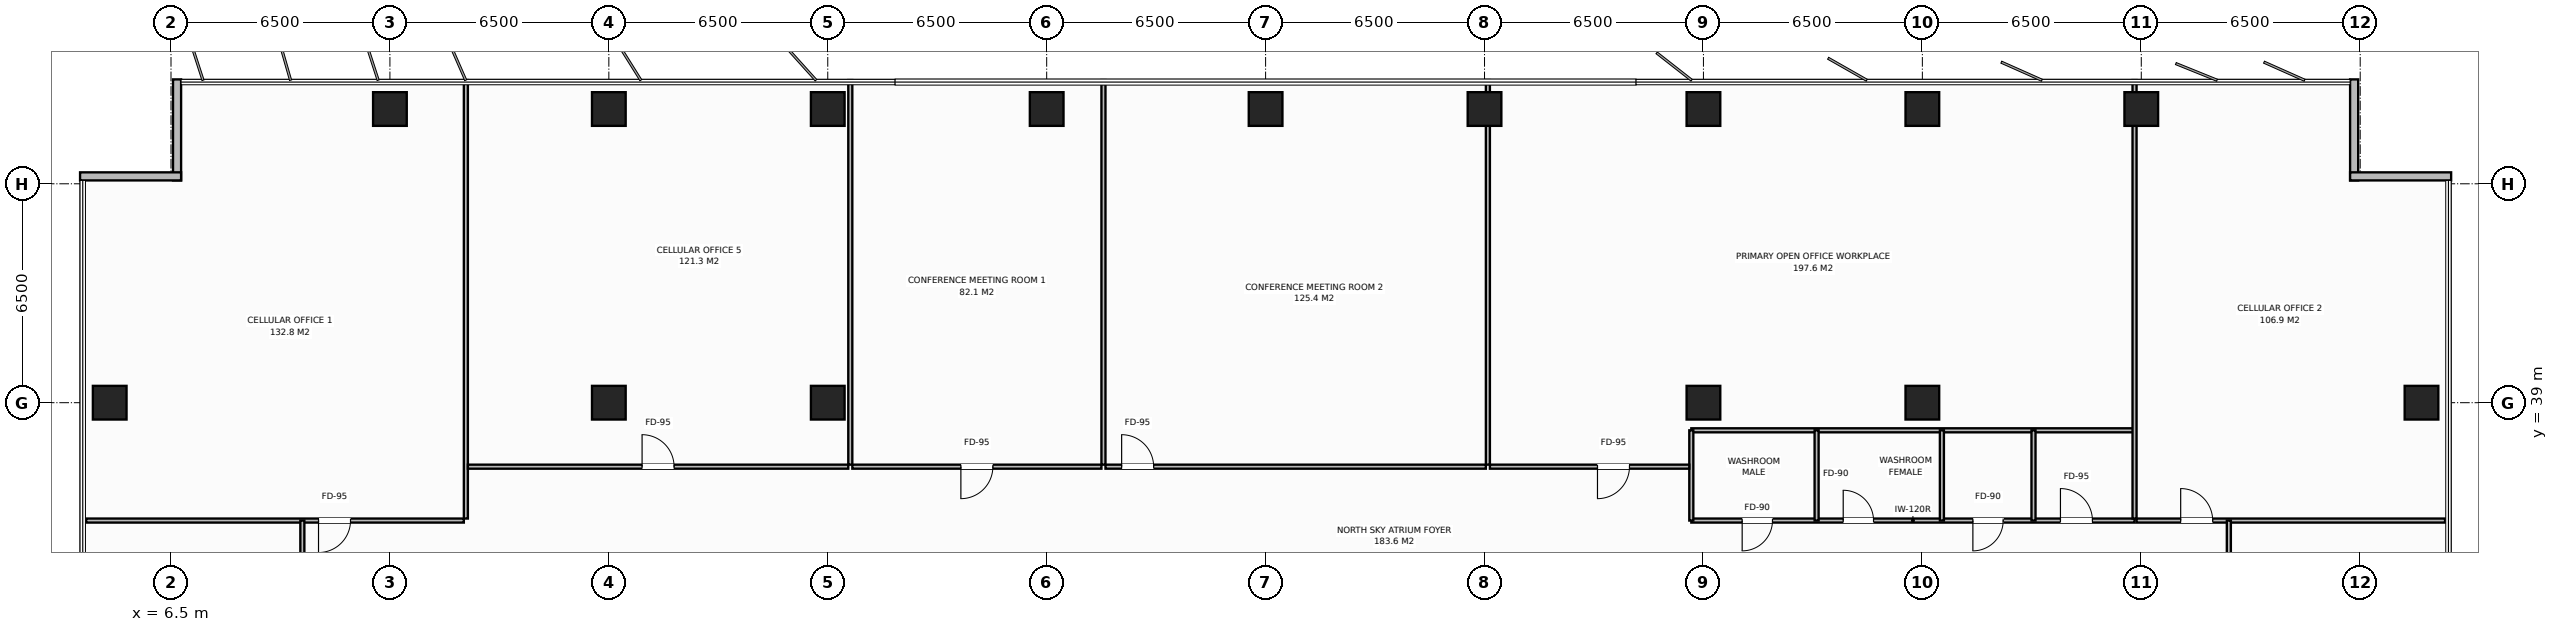
"""IFC4 building model, lengths in metres.
Left out: names, types, materials, properties, quantities, classifications, styles, units other than length and angle.
Written with IfcOpenShell. Run it as: python <this file> out.ifc"""

import sys

from ifc_helpers import new_model, si_unit, direction, frame, frame_2d, origin, origin_2d, place, context, subcontext, project, spatial, rectangle, extrude, element, fill, save


model = new_model("IFC4")
c1 = context("Model", 3, precision=1e-05, world=origin(), true_north=direction((0.0, 1.0)))
c2 = subcontext(c1, "Body", "Model", "MODEL_VIEW")
j1 = project(units=[si_unit("LENGTHUNIT", "METRE"), si_unit("PLANEANGLEUNIT", "RADIAN")], contexts=[c1])
p1 = place(None, origin())
s1 = spatial("IfcSite", under=j1, at=p1, CompositionType="ELEMENT")
p2 = place(p1, origin())
s2 = spatial("IfcBuilding", under=s1, at=p2, CompositionType="ELEMENT")
p3 = place(p2, frame((0.0, 0.0, 167.0)))
s3 = spatial("IfcBuildingStorey", under=s2, at=p3, CompositionType="ELEMENT", Elevation=167.0)
for number, where, z_axis, x_axis in (
    (1, (19.5, 39.0, 0.0), (0.0, 0.0, 1.0), (1.0, 0.0, 0.0)),
    (2, (58.5, 39.0, 0.0), (0.0, 0.0, 1.0), (1.0, 0.0, 0.0)),
    (3, (26.0, 39.0, 0.0), (0.0, 0.0, 1.0), (1.0, 0.0, 0.0)),
    (4, (52.0, 39.0, 0.0), (0.0, 0.0, 1.0), (1.0, 0.0, 0.0)),
    (5, (13.0, 47.72, 0.0), (0.0, 0.0, 1.0), (1.0, 0.0, 0.0)),
    (6, (19.5, 47.72, 0.0), (0.0, 0.0, 1.0), (1.0, 0.0, 0.0)),
    (7, (26.0, 47.72, 0.0), (0.0, 0.0, 1.0), (1.0, 0.0, 0.0)),
    (8, (32.5, 47.72, 0.0), (0.0, 0.0, 1.0), (1.0, 0.0, 0.0)),
    (9, (39.0, 47.72, 0.0), (0.0, 0.0, 1.0), (1.0, 0.0, 0.0)),
    (10, (45.5, 47.72, 0.0), (0.0, 0.0, 1.0), (1.0, 0.0, 0.0)),
    (11, (52.0, 47.72, 0.0), (0.0, 0.0, 1.0), (1.0, 0.0, 0.0)),
    (12, (58.5, 47.72, 0.0), (0.0, 0.0, 1.0), (1.0, 0.0, 0.0)),
    (13, (65.0, 47.72, 0.0), (0.0, 0.0, 1.0), (1.0, 0.0, 0.0)),
    (14, (4.68, 39.0, 0.0), (0.0, 0.0, 1.0), (1.0, 0.0, 0.0)),
    (15, (73.32, 39.0, 0.0), (0.0, 0.0, 1.0), (1.0, 0.0, 0.0)),
):
    element("IfcColumn", number, at=place(p3, frame(where, z_axis=z_axis, x_axis=x_axis)), inside=s3, PredefinedType="COLUMN", context=c2, shape_type="SweptSolid", body=[
        extrude(rectangle(XDim=1.0, YDim=1.0, at=origin_2d()), origin(), (0.0, 0.0, 1.0), 3.8),
    ])
for number, where, z_axis, x_axis in (
    (16, (6.68, 45.6, 0.0), (0.0, 0.0, 1.0), (0.0, 1.0, 0.0)),
    (17, (3.8, 45.72, 0.0), (0.0, 0.0, 1.0), (1.0, 0.0, 0.0)),
    (18, (71.32, 48.6, 0.0), (0.0, 0.0, 1.0), (0.0, -1.0, 0.0)),
    (19, (71.2, 45.72, 0.0), (0.0, 0.0, 1.0), (1.0, 0.0, 0.0)),
):
    element("IfcWall", number, at=place(p3, frame(where, z_axis=z_axis, x_axis=x_axis)), inside=s3, PredefinedType="STANDARD", context=c2, shape_type="SweptSolid", body=[
        extrude(rectangle(XDim=3.0, YDim=0.24, at=frame_2d((1.5, 0.0))), origin(), (0.0, 0.0, 1.0), 3.572),
    ])
p4 = place(p3, frame((51.64, 35.5, 0.0), z_axis=(0.0, 0.0, 1.0), x_axis=(1.0, 0.0, 0.0)))
e20 = element("IfcWall", 20, at=p4, inside=s3, PredefinedType="PARTITIONING", context=c2, shape_type="SweptSolid", body=[
    extrude(rectangle(XDim=13.16, YDim=0.12, at=frame_2d((6.58, 0.0))), origin(), (0.0, 0.0, 1.0), 3.572),
])
p5 = place(p4, frame((1.51, 0.0, 0.0)))
e21 = element("IfcOpeningElement", 21, at=p5, cuts=e20, PredefinedType="OPENING", context=c2, shape_type="SweptSolid", body=[
    extrude(rectangle(XDim=0.9, YDim=2.15, at=frame_2d((0.45, 1.075))), frame((0.0, 0.07, 0.0), z_axis=(0.0, -1.0, 0.0), x_axis=(1.0, 0.0, 0.0)), (0.0, 0.0, 1.0), 0.14),
])
p6 = place(p4, frame((4.51, 0.0, 0.0)))
e22 = element("IfcOpeningElement", 22, at=p6, cuts=e20, PredefinedType="OPENING", context=c2, shape_type="SweptSolid", body=[
    extrude(rectangle(XDim=0.9, YDim=2.15, at=frame_2d((0.45, 1.075))), frame((0.0, 0.07, 0.0), z_axis=(0.0, -1.0, 0.0), x_axis=(1.0, 0.0, 0.0)), (0.0, 0.0, 1.0), 0.14),
])
p7 = place(p4, frame((8.36, 0.0, 0.0)))
e23 = element("IfcOpeningElement", 23, at=p7, cuts=e20, PredefinedType="OPENING", context=c2, shape_type="SweptSolid", body=[
    extrude(rectangle(XDim=0.9, YDim=2.15, at=frame_2d((0.45, 1.075))), frame((0.0, 0.07, 0.0), z_axis=(0.0, -1.0, 0.0), x_axis=(1.0, 0.0, 0.0)), (0.0, 0.0, 1.0), 0.14),
])
p8 = place(p4, frame((10.96, 0.0, 0.0)))
e24 = element("IfcOpeningElement", 24, at=p8, cuts=e20, PredefinedType="OPENING", context=c2, shape_type="SweptSolid", body=[
    extrude(rectangle(XDim=0.95, YDim=2.15, at=frame_2d((0.475, 1.075))), frame((0.0, 0.07, 0.0), z_axis=(0.0, -1.0, 0.0), x_axis=(1.0, 0.0, 0.0)), (0.0, 0.0, 1.0), 0.14),
])
p9 = place(p3, frame((51.64, 38.18, 0.0), z_axis=(0.0, 0.0, 1.0), x_axis=(1.0, 0.0, 0.0)))
e25 = element("IfcWall", 25, at=p9, inside=s3, PredefinedType="PARTITIONING", context=c2, shape_type="SweptSolid", body=[
    extrude(rectangle(XDim=13.16, YDim=0.12, at=frame_2d((6.58, 0.0))), origin(), (0.0, 0.0, 1.0), 3.572),
])
for number, where, z_axis, x_axis in (
    (26, (51.64, 35.5, 0.0), (0.0, 0.0, 1.0), (0.0, 1.0, 0.0)),
    (27, (55.36, 35.5, 0.0), (0.0, 0.0, 1.0), (0.0, 1.0, 0.0)),
    (28, (59.08, 35.5, 0.0), (0.0, 0.0, 1.0), (0.0, 1.0, 0.0)),
    (29, (61.8, 35.5, 0.0), (0.0, 0.0, 1.0), (0.0, 1.0, 0.0)),
):
    element("IfcWall", number, at=place(p3, frame(where, z_axis=z_axis, x_axis=x_axis)), inside=s3, PredefinedType="PARTITIONING", context=c2, shape_type="SweptSolid", body=[
        extrude(rectangle(XDim=2.68, YDim=0.12, at=frame_2d((1.34, 0.0))), origin(), (0.0, 0.0, 1.0), 3.572),
    ])
p10 = place(p3, frame((15.255, 35.56, 0.0), z_axis=(0.0, 0.0, 1.0), x_axis=(0.0, 1.0, 0.0)))
e30 = element("IfcWall", 30, at=p10, inside=s3, PredefinedType="PARTITIONING", context=c2, shape_type="SweptSolid", body=[
    extrude(rectangle(XDim=13.02, YDim=0.12, at=frame_2d((6.51, 0.0))), origin(), (0.0, 0.0, 1.0), 3.572),
])
p11 = place(p3, frame((3.98, 35.5, 0.0), z_axis=(0.0, 0.0, 1.0), x_axis=(1.0, 0.0, 0.0)))
e31 = element("IfcWall", 31, at=p11, inside=s3, PredefinedType="PARTITIONING", context=c2, shape_type="SweptSolid", body=[
    extrude(rectangle(XDim=11.215, YDim=0.12, at=frame_2d((5.607, 0.0))), origin(), (0.0, 0.0, 1.0), 3.572),
])
p12 = place(p11, frame((6.9, 0.0, 0.0)))
e32 = element("IfcOpeningElement", 32, at=p12, cuts=e31, PredefinedType="OPENING", context=c2, shape_type="SweptSolid", body=[
    extrude(rectangle(XDim=0.95, YDim=2.15, at=frame_2d((0.475, 1.075))), frame((0.0, 0.07, 0.0), z_axis=(0.0, -1.0, 0.0), x_axis=(1.0, 0.0, 0.0)), (0.0, 0.0, 1.0), 0.14),
])
p13 = place(p3, frame((26.669, 37.16, 0.0), z_axis=(0.0, 0.0, 1.0), x_axis=(0.0, 1.0, 0.0)))
e33 = element("IfcWall", 33, at=p13, inside=s3, PredefinedType="PARTITIONING", context=c2, shape_type="SweptSolid", body=[
    extrude(rectangle(XDim=11.42, YDim=0.12, at=frame_2d((5.71, 0.0))), origin(), (0.0, 0.0, 1.0), 3.572),
])
p14 = place(p3, frame((15.315, 37.1, 0.0), z_axis=(0.0, 0.0, 1.0), x_axis=(1.0, 0.0, 0.0)))
e34 = element("IfcWall", 34, at=p14, inside=s3, PredefinedType="PARTITIONING", context=c2, shape_type="SweptSolid", body=[
    extrude(rectangle(XDim=11.294, YDim=0.12, at=frame_2d((5.647, 0.0))), origin(), (0.0, 0.0, 1.0), 3.572),
])
p15 = place(p14, frame((5.172, 0.0, 0.0)))
e35 = element("IfcOpeningElement", 35, at=p15, cuts=e34, PredefinedType="OPENING", context=c2, shape_type="SweptSolid", body=[
    extrude(rectangle(XDim=0.95, YDim=2.15, at=frame_2d((0.475, 1.075))), frame((0.0, 0.07, 0.0), z_axis=(0.0, -1.0, 0.0), x_axis=(1.0, 0.0, 0.0)), (0.0, 0.0, 1.0), 0.14),
])
p16 = place(p3, frame((34.186, 37.16, 0.0), z_axis=(0.0, 0.0, 1.0), x_axis=(0.0, 1.0, 0.0)))
e36 = element("IfcWall", 36, at=p16, inside=s3, PredefinedType="PARTITIONING", context=c2, shape_type="SweptSolid", body=[
    extrude(rectangle(XDim=11.42, YDim=0.12, at=frame_2d((5.71, 0.0))), origin(), (0.0, 0.0, 1.0), 3.572),
])
p17 = place(p3, frame((26.729, 37.1, 0.0), z_axis=(0.0, 0.0, 1.0), x_axis=(1.0, 0.0, 0.0)))
e37 = element("IfcWall", 37, at=p17, inside=s3, PredefinedType="PARTITIONING", context=c2, shape_type="SweptSolid", body=[
    extrude(rectangle(XDim=7.396, YDim=0.12, at=frame_2d((3.698, 0.0))), origin(), (0.0, 0.0, 1.0), 3.572),
])
p18 = place(p17, frame((3.223, 0.0, 0.0)))
e38 = element("IfcOpeningElement", 38, at=p18, cuts=e37, PredefinedType="OPENING", context=c2, shape_type="SweptSolid", body=[
    extrude(rectangle(XDim=0.95, YDim=2.15, at=frame_2d((0.475, 1.075))), frame((0.0, 0.07, 0.0), z_axis=(0.0, -1.0, 0.0), x_axis=(1.0, 0.0, 0.0)), (0.0, 0.0, 1.0), 0.14),
])
p19 = place(p3, frame((45.6, 37.16, 0.0), z_axis=(0.0, 0.0, 1.0), x_axis=(0.0, 1.0, 0.0)))
e39 = element("IfcWall", 39, at=p19, inside=s3, PredefinedType="PARTITIONING", context=c2, shape_type="SweptSolid", body=[
    extrude(rectangle(XDim=11.42, YDim=0.12, at=frame_2d((5.71, 0.0))), origin(), (0.0, 0.0, 1.0), 3.022),
])
p20 = place(p3, frame((34.246, 37.1, 0.0), z_axis=(0.0, 0.0, 1.0), x_axis=(1.0, 0.0, 0.0)))
e40 = element("IfcWall", 40, at=p20, inside=s3, PredefinedType="PARTITIONING", context=c2, shape_type="SweptSolid", body=[
    extrude(rectangle(XDim=11.294, YDim=0.12, at=frame_2d((5.647, 0.0))), origin(), (0.0, 0.0, 1.0), 3.572),
])
p21 = place(p20, frame((0.48, 0.0, 0.0)))
e41 = element("IfcOpeningElement", 41, at=p21, cuts=e40, PredefinedType="OPENING", context=c2, shape_type="SweptSolid", body=[
    extrude(rectangle(XDim=0.95, YDim=2.15, at=frame_2d((0.475, 1.075))), frame((0.0, 0.07, 0.0), z_axis=(0.0, -1.0, 0.0), x_axis=(1.0, 0.0, 0.0)), (0.0, 0.0, 1.0), 0.14),
])
p22 = place(p3, frame((64.8, 35.56, 0.0), z_axis=(0.0, 0.0, 1.0), x_axis=(0.0, 1.0, 0.0)))
e42 = element("IfcWall", 42, at=p22, inside=s3, PredefinedType="PARTITIONING", context=c2, shape_type="SweptSolid", body=[
    extrude(rectangle(XDim=13.02, YDim=0.12, at=frame_2d((6.51, 0.0))), origin(), (0.0, 0.0, 1.0), 3.022),
])
p23 = place(p3, frame((45.66, 37.1, 0.0), z_axis=(0.0, 0.0, 1.0), x_axis=(1.0, 0.0, 0.0)))
e43 = element("IfcWall", 43, at=p23, inside=s3, PredefinedType="PARTITIONING", context=c2, shape_type="SweptSolid", body=[
    extrude(rectangle(XDim=5.92, YDim=0.12, at=frame_2d((2.96, 0.0))), origin(), (0.0, 0.0, 1.0), 3.572),
])
p24 = place(p23, frame((3.194, 0.0, 0.0)))
e44 = element("IfcOpeningElement", 44, at=p24, cuts=e43, PredefinedType="OPENING", context=c2, shape_type="SweptSolid", body=[
    extrude(rectangle(XDim=0.95, YDim=2.15, at=frame_2d((0.475, 1.075))), frame((0.0, 0.07, 0.0), z_axis=(0.0, -1.0, 0.0), x_axis=(1.0, 0.0, 0.0)), (0.0, 0.0, 1.0), 0.14),
])
p25 = place(p3, frame((64.86, 35.5, 0.0), z_axis=(0.0, 0.0, 1.0), x_axis=(1.0, 0.0, 0.0)))
e45 = element("IfcWall", 45, at=p25, inside=s3, PredefinedType="PARTITIONING", context=c2, shape_type="SweptSolid", body=[
    extrude(rectangle(XDim=9.16, YDim=0.12, at=frame_2d((4.58, 0.0))), origin(), (0.0, 0.0, 1.0), 3.572),
])
p26 = place(p25, frame((1.31, 0.0, 0.0)))
e46 = element("IfcOpeningElement", 46, at=p26, cuts=e45, PredefinedType="OPENING", context=c2, shape_type="SweptSolid", body=[
    extrude(rectangle(XDim=0.95, YDim=2.15, at=frame_2d((0.475, 1.075))), frame((0.0, 0.07, 0.0), z_axis=(0.0, -1.0, 0.0), x_axis=(1.0, 0.0, 0.0)), (0.0, 0.0, 1.0), 0.14),
])
p27 = place(p3, frame((10.4, 16.5, 0.0), z_axis=(0.0, 0.0, 1.0), x_axis=(0.0, 1.0, 0.0)))
e47 = element("IfcWall", 47, at=p27, inside=s3, PredefinedType="PARTITIONING", context=c2, shape_type="SweptSolid", body=[
    extrude(rectangle(XDim=19.0, YDim=0.12, at=frame_2d((9.5, 0.0))), origin(), (0.0, 0.0, 1.0), 3.572),
])
p28 = place(p27, frame((9.025, 0.0, 0.0)))
e48 = element("IfcOpeningElement", 48, at=p28, cuts=e47, PredefinedType="OPENING", context=c2, shape_type="SweptSolid", body=[
    extrude(rectangle(XDim=0.95, YDim=2.15, at=frame_2d((0.475, 1.075))), frame((0.0, 0.07, 0.0), z_axis=(0.0, -1.0, 0.0), x_axis=(1.0, 0.0, 0.0)), (0.0, 0.0, 1.0), 0.14),
])
p29 = place(p3, frame((67.6, 26.0, 0.0), z_axis=(0.0, 0.0, 1.0), x_axis=(0.0, 1.0, 0.0)))
e49 = element("IfcWall", 49, at=p29, inside=s3, PredefinedType="PARTITIONING", context=c2, shape_type="SweptSolid", body=[
    extrude(rectangle(XDim=9.5, YDim=0.12, at=frame_2d((4.75, 0.0))), origin(), (0.0, 0.0, 1.0), 3.572),
])
p30 = place(p29, frame((3.225, 0.0, 0.0)))
e50 = element("IfcOpeningElement", 50, at=p30, cuts=e49, PredefinedType="OPENING", context=c2, shape_type="SweptSolid", body=[
    extrude(rectangle(XDim=0.95, YDim=2.15, at=frame_2d((0.475, 1.075))), frame((0.0, 0.07, 0.0), z_axis=(0.0, -1.0, 0.0), x_axis=(1.0, 0.0, 0.0)), (0.0, 0.0, 1.0), 0.14),
])
p31 = place(p5, origin())
e51 = element("IfcDoor", 51, at=p31, inside=s3, OperationType="SINGLE_SWING_RIGHT", PredefinedType="DOOR", context=c2, shape_type="SweptSolid", body=[
    extrude(rectangle(XDim=0.9, YDim=2.15, at=frame_2d((0.45, 1.075))), frame((0.0, 0.025, 0.0), z_axis=(0.0, -1.0, 0.0), x_axis=(1.0, 0.0, 0.0)), (0.0, 0.0, 1.0), 0.05),
])
fill(e21, e51)
p32 = place(p6, origin())
e52 = element("IfcDoor", 52, at=p32, inside=s3, OperationType="SINGLE_SWING_LEFT", PredefinedType="DOOR", context=c2, shape_type="SweptSolid", body=[
    extrude(rectangle(XDim=0.9, YDim=2.15, at=frame_2d((0.45, 1.075))), frame((0.0, 0.025, 0.0), z_axis=(0.0, -1.0, 0.0), x_axis=(1.0, 0.0, 0.0)), (0.0, 0.0, 1.0), 0.05),
])
fill(e22, e52)
p33 = place(p7, origin())
e53 = element("IfcDoor", 53, at=p33, inside=s3, OperationType="SINGLE_SWING_RIGHT", PredefinedType="DOOR", context=c2, shape_type="SweptSolid", body=[
    extrude(rectangle(XDim=0.9, YDim=2.15, at=frame_2d((0.45, 1.075))), frame((0.0, 0.025, 0.0), z_axis=(0.0, -1.0, 0.0), x_axis=(1.0, 0.0, 0.0)), (0.0, 0.0, 1.0), 0.05),
])
fill(e23, e53)
p34 = place(p8, origin())
e54 = element("IfcDoor", 54, at=p34, inside=s3, OperationType="SINGLE_SWING_LEFT", PredefinedType="DOOR", context=c2, shape_type="SweptSolid", body=[
    extrude(rectangle(XDim=0.95, YDim=2.15, at=frame_2d((0.475, 1.075))), frame((0.0, 0.025, 0.0), z_axis=(0.0, -1.0, 0.0), x_axis=(1.0, 0.0, 0.0)), (0.0, 0.0, 1.0), 0.05),
])
fill(e24, e54)
p35 = place(p12, origin())
e55 = element("IfcDoor", 55, at=p35, inside=s3, OperationType="SINGLE_SWING_RIGHT", PredefinedType="DOOR", context=c2, shape_type="SweptSolid", body=[
    extrude(rectangle(XDim=0.95, YDim=2.15, at=frame_2d((0.475, 1.075))), frame((0.0, 0.025, 0.0), z_axis=(0.0, -1.0, 0.0), x_axis=(1.0, 0.0, 0.0)), (0.0, 0.0, 1.0), 0.05),
])
fill(e32, e55)
p36 = place(p15, origin())
e56 = element("IfcDoor", 56, at=p36, inside=s3, OperationType="SINGLE_SWING_LEFT", PredefinedType="DOOR", context=c2, shape_type="SweptSolid", body=[
    extrude(rectangle(XDim=0.95, YDim=2.15, at=frame_2d((0.475, 1.075))), frame((0.0, 0.025, 0.0), z_axis=(0.0, -1.0, 0.0), x_axis=(1.0, 0.0, 0.0)), (0.0, 0.0, 1.0), 0.05),
])
fill(e35, e56)
p37 = place(p18, origin())
e57 = element("IfcDoor", 57, at=p37, inside=s3, OperationType="SINGLE_SWING_RIGHT", PredefinedType="DOOR", context=c2, shape_type="SweptSolid", body=[
    extrude(rectangle(XDim=0.95, YDim=2.15, at=frame_2d((0.475, 1.075))), frame((0.0, 0.025, 0.0), z_axis=(0.0, -1.0, 0.0), x_axis=(1.0, 0.0, 0.0)), (0.0, 0.0, 1.0), 0.05),
])
fill(e38, e57)
p38 = place(p21, origin())
e58 = element("IfcDoor", 58, at=p38, inside=s3, OperationType="SINGLE_SWING_LEFT", PredefinedType="DOOR", context=c2, shape_type="SweptSolid", body=[
    extrude(rectangle(XDim=0.95, YDim=2.15, at=frame_2d((0.475, 1.075))), frame((0.0, 0.025, 0.0), z_axis=(0.0, -1.0, 0.0), x_axis=(1.0, 0.0, 0.0)), (0.0, 0.0, 1.0), 0.05),
])
fill(e41, e58)
p39 = place(p24, origin())
e59 = element("IfcDoor", 59, at=p39, inside=s3, OperationType="SINGLE_SWING_RIGHT", PredefinedType="DOOR", context=c2, shape_type="SweptSolid", body=[
    extrude(rectangle(XDim=0.95, YDim=2.15, at=frame_2d((0.475, 1.075))), frame((0.0, 0.025, 0.0), z_axis=(0.0, -1.0, 0.0), x_axis=(1.0, 0.0, 0.0)), (0.0, 0.0, 1.0), 0.05),
])
fill(e44, e59)
p40 = place(p26, origin())
e60 = element("IfcDoor", 60, at=p40, inside=s3, OperationType="SINGLE_SWING_LEFT", PredefinedType="DOOR", context=c2, shape_type="SweptSolid", body=[
    extrude(rectangle(XDim=0.95, YDim=2.15, at=frame_2d((0.475, 1.075))), frame((0.0, 0.025, 0.0), z_axis=(0.0, -1.0, 0.0), x_axis=(1.0, 0.0, 0.0)), (0.0, 0.0, 1.0), 0.05),
])
fill(e46, e60)
save(model, sys.argv[1])
